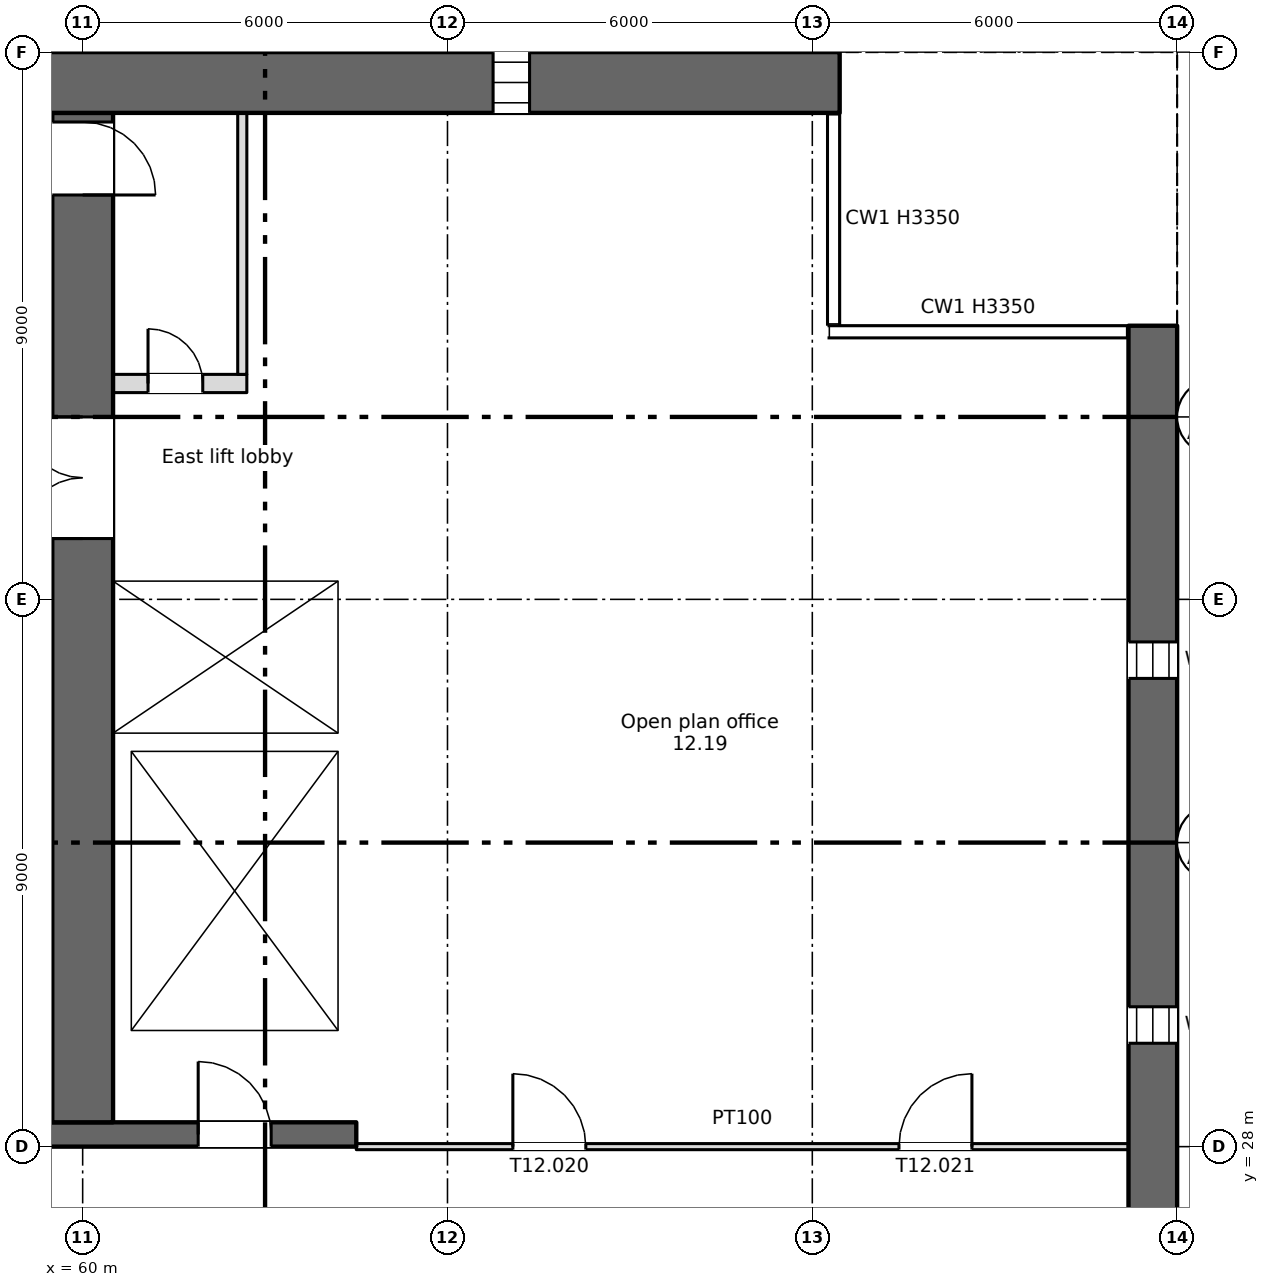
"""IFC4 building model, lengths in metres.
Left out: names, types, materials, properties, quantities, classifications, styles, units other than length and angle.
Written with IfcOpenShell. Run it as: python <this file> out.ifc"""

import sys

from ifc_helpers import new_model, si_unit, direction, frame, frame_2d, origin, place, context, subcontext, project, spatial, rectangle, extrude, element, fill, save


model = new_model("IFC4")
c1 = context("Model", 3, precision=1e-05, world=origin(), true_north=direction((0.0, 1.0)))
c2 = subcontext(c1, "Body", "Model", "MODEL_VIEW")
j1 = project(units=[si_unit("LENGTHUNIT", "METRE"), si_unit("PLANEANGLEUNIT", "RADIAN")], contexts=[c1])
p1 = place(None, origin())
s1 = spatial("IfcSite", under=j1, at=p1, CompositionType="ELEMENT")
p2 = place(p1, origin())
s2 = spatial("IfcBuilding", under=s1, at=p2, CompositionType="ELEMENT")
p3 = place(p2, frame((0.0, 0.0, 60.0)))
s3 = spatial("IfcBuildingStorey", under=s2, at=p3, CompositionType="ELEMENT", Elevation=60.0)
p4 = place(p3, frame((77.6, 4.5, 0.0), z_axis=(0.0, 0.0, 1.0), x_axis=(0.0, 1.0, 0.0)))
e1 = element("IfcWall", 1, at=p4, inside=s3, PredefinedType="SHEAR", context=c2, shape_type="SweptSolid", body=[
    extrude(rectangle(XDim=37.0, YDim=0.8, at=frame_2d((18.5, 0.0))), origin(), (0.0, 0.0, 1.0), 3.35),
])
p5 = place(p4, frame((1.2, 0.0, 0.6)))
e2 = element("IfcOpeningElement", 2, at=p5, cuts=e1, PredefinedType="OPENING", context=c2, shape_type="SweptSolid", body=[
    extrude(rectangle(XDim=0.6, YDim=2.4, at=frame_2d((0.3, 1.2))), frame((0.0, 0.41, 0.0), z_axis=(0.0, -1.0, 0.0), x_axis=(1.0, 0.0, 0.0)), (0.0, 0.0, 1.0), 0.82),
])
p6 = place(p4, frame((7.2, 0.0, 0.6)))
e3 = element("IfcOpeningElement", 3, at=p6, cuts=e1, PredefinedType="OPENING", context=c2, shape_type="SweptSolid", body=[
    extrude(rectangle(XDim=0.6, YDim=2.4, at=frame_2d((0.3, 1.2))), frame((0.0, 0.41, 0.0), z_axis=(0.0, -1.0, 0.0), x_axis=(1.0, 0.0, 0.0)), (0.0, 0.0, 1.0), 0.82),
])
p7 = place(p4, frame((13.2, 0.0, 0.6)))
e4 = element("IfcOpeningElement", 4, at=p7, cuts=e1, PredefinedType="OPENING", context=c2, shape_type="SweptSolid", body=[
    extrude(rectangle(XDim=0.6, YDim=2.4, at=frame_2d((0.3, 1.2))), frame((0.0, 0.41, 0.0), z_axis=(0.0, -1.0, 0.0), x_axis=(1.0, 0.0, 0.0)), (0.0, 0.0, 1.0), 0.82),
])
p8 = place(p4, frame((19.2, 0.0, 0.6)))
e5 = element("IfcOpeningElement", 5, at=p8, cuts=e1, PredefinedType="OPENING", context=c2, shape_type="SweptSolid", body=[
    extrude(rectangle(XDim=0.6, YDim=2.4, at=frame_2d((0.3, 1.2))), frame((0.0, 0.41, 0.0), z_axis=(0.0, -1.0, 0.0), x_axis=(1.0, 0.0, 0.0)), (0.0, 0.0, 1.0), 0.82),
])
p9 = place(p4, frame((25.2, 0.0, 0.6)))
e6 = element("IfcOpeningElement", 6, at=p9, cuts=e1, PredefinedType="OPENING", context=c2, shape_type="SweptSolid", body=[
    extrude(rectangle(XDim=0.6, YDim=2.4, at=frame_2d((0.3, 1.2))), frame((0.0, 0.41, 0.0), z_axis=(0.0, -1.0, 0.0), x_axis=(1.0, 0.0, 0.0)), (0.0, 0.0, 1.0), 0.82),
])
p10 = place(p4, frame((31.2, 0.0, 0.6)))
e7 = element("IfcOpeningElement", 7, at=p10, cuts=e1, PredefinedType="OPENING", context=c2, shape_type="SweptSolid", body=[
    extrude(rectangle(XDim=0.6, YDim=2.4, at=frame_2d((0.3, 1.2))), frame((0.0, 0.41, 0.0), z_axis=(0.0, -1.0, 0.0), x_axis=(1.0, 0.0, 0.0)), (0.0, 0.0, 1.0), 0.82),
])
p11 = place(p3, frame((5.55, 45.5, 0.0), z_axis=(0.0, 0.0, 1.0), x_axis=(1.0, 0.0, 0.0)))
e8 = element("IfcWall", 8, at=p11, inside=s3, PredefinedType="SHEAR", context=c2, shape_type="SweptSolid", body=[
    extrude(rectangle(XDim=66.9, YDim=1.0, at=frame_2d((33.45, 0.0))), origin(), (0.0, 0.0, 1.0), 3.35),
])
p12 = place(p11, frame((1.2, 0.0, 0.6)))
e9 = element("IfcOpeningElement", 9, at=p12, cuts=e8, PredefinedType="OPENING", context=c2, shape_type="SweptSolid", body=[
    extrude(rectangle(XDim=0.6, YDim=2.4, at=frame_2d((0.3, 1.2))), frame((0.0, 0.51, 0.0), z_axis=(0.0, -1.0, 0.0), x_axis=(1.0, 0.0, 0.0)), (0.0, 0.0, 1.0), 1.02),
])
p13 = place(p11, frame((7.2, 0.0, 0.6)))
e10 = element("IfcOpeningElement", 10, at=p13, cuts=e8, PredefinedType="OPENING", context=c2, shape_type="SweptSolid", body=[
    extrude(rectangle(XDim=0.6, YDim=2.4, at=frame_2d((0.3, 1.2))), frame((0.0, 0.51, 0.0), z_axis=(0.0, -1.0, 0.0), x_axis=(1.0, 0.0, 0.0)), (0.0, 0.0, 1.0), 1.02),
])
p14 = place(p11, frame((61.2, 0.0, 0.6)))
e11 = element("IfcOpeningElement", 11, at=p14, cuts=e8, PredefinedType="OPENING", context=c2, shape_type="SweptSolid", body=[
    extrude(rectangle(XDim=0.6, YDim=2.4, at=frame_2d((0.3, 1.2))), frame((0.0, 0.51, 0.0), z_axis=(0.0, -1.0, 0.0), x_axis=(1.0, 0.0, 0.0)), (0.0, 0.0, 1.0), 1.02),
])
p15 = place(p3, frame((6.7, 28.2, 0.0), z_axis=(0.0, 0.0, 1.0), x_axis=(1.0, 0.0, 0.0)))
e12 = element("IfcWall", 12, at=p15, inside=s3, PredefinedType="SHEAR", context=c2, shape_type="SweptSolid", body=[
    extrude(rectangle(XDim=57.8, YDim=0.4, at=frame_2d((28.9, 0.0))), origin(), (0.0, 0.0, 1.0), 3.35),
])
p16 = place(p15, frame((13.85, 0.0, 0.0)))
e13 = element("IfcOpeningElement", 13, at=p16, cuts=e12, PredefinedType="OPENING", context=c2, shape_type="SweptSolid", body=[
    extrude(rectangle(XDim=0.9, YDim=2.1, at=frame_2d((0.45, 1.05))), frame((0.0, 0.21, 0.0), z_axis=(0.0, -1.0, 0.0), x_axis=(1.0, 0.0, 0.0)), (0.0, 0.0, 1.0), 0.42),
])
p17 = place(p15, frame((48.562, 0.0, 0.0)))
e14 = element("IfcOpeningElement", 14, at=p17, cuts=e12, PredefinedType="OPENING", context=c2, shape_type="SweptSolid", body=[
    extrude(rectangle(XDim=0.9, YDim=2.1, at=frame_2d((0.45, 1.05))), frame((0.0, 0.21, 0.0), z_axis=(0.0, -1.0, 0.0), x_axis=(1.0, 0.0, 0.0)), (0.0, 0.0, 1.0), 0.42),
])
p18 = place(p15, frame((51.137, 0.0, 0.0)))
e15 = element("IfcOpeningElement", 15, at=p18, cuts=e12, PredefinedType="OPENING", context=c2, shape_type="SweptSolid", body=[
    extrude(rectangle(XDim=0.9, YDim=2.1, at=frame_2d((0.45, 1.05))), frame((0.0, 0.21, 0.0), z_axis=(0.0, -1.0, 0.0), x_axis=(1.0, 0.0, 0.0)), (0.0, 0.0, 1.0), 0.42),
])
p19 = place(p15, frame((1.35, 0.0, 0.0)))
e16 = element("IfcOpeningElement", 16, at=p19, cuts=e12, PredefinedType="OPENING", context=c2, shape_type="SweptSolid", body=[
    extrude(rectangle(XDim=0.9, YDim=2.1, at=frame_2d((0.45, 1.05))), frame((0.0, 0.21, 0.0), z_axis=(0.0, -1.0, 0.0), x_axis=(1.0, 0.0, 0.0)), (0.0, 0.0, 1.0), 0.42),
])
p20 = place(p15, frame((4.7, 0.0, 0.0)))
e17 = element("IfcOpeningElement", 17, at=p20, cuts=e12, PredefinedType="OPENING", context=c2, shape_type="SweptSolid", body=[
    extrude(rectangle(XDim=1.2, YDim=2.1, at=frame_2d((0.6, 1.05))), frame((0.0, 0.21, 0.0), z_axis=(0.0, -1.0, 0.0), x_axis=(1.0, 0.0, 0.0)), (0.0, 0.0, 1.0), 0.42),
])
p21 = place(p15, frame((31.7, 0.0, 0.0)))
e18 = element("IfcOpeningElement", 18, at=p21, cuts=e12, PredefinedType="OPENING", context=c2, shape_type="SweptSolid", body=[
    extrude(rectangle(XDim=1.2, YDim=2.1, at=frame_2d((0.6, 1.05))), frame((0.0, 0.21, 0.0), z_axis=(0.0, -1.0, 0.0), x_axis=(1.0, 0.0, 0.0)), (0.0, 0.0, 1.0), 0.42),
])
p22 = place(p15, frame((55.2, 0.0, 0.0)))
e19 = element("IfcOpeningElement", 19, at=p22, cuts=e12, PredefinedType="OPENING", context=c2, shape_type="SweptSolid", body=[
    extrude(rectangle(XDim=1.2, YDim=2.1, at=frame_2d((0.6, 1.05))), frame((0.0, 0.21, 0.0), z_axis=(0.0, -1.0, 0.0), x_axis=(1.0, 0.0, 0.0)), (0.0, 0.0, 1.0), 0.42),
])
p23 = place(p15, frame((21.7, 0.0, 0.0)))
e20 = element("IfcOpeningElement", 20, at=p23, cuts=e12, PredefinedType="OPENING", context=c2, shape_type="SweptSolid", body=[
    extrude(rectangle(XDim=1.2, YDim=2.1, at=frame_2d((0.6, 1.05))), frame((0.0, 0.21, 0.0), z_axis=(0.0, -1.0, 0.0), x_axis=(1.0, 0.0, 0.0)), (0.0, 0.0, 1.0), 0.42),
])
p24 = place(p15, frame((41.7, 0.0, 0.0)))
e21 = element("IfcOpeningElement", 21, at=p24, cuts=e12, PredefinedType="OPENING", context=c2, shape_type="SweptSolid", body=[
    extrude(rectangle(XDim=1.2, YDim=2.1, at=frame_2d((0.6, 1.05))), frame((0.0, 0.21, 0.0), z_axis=(0.0, -1.0, 0.0), x_axis=(1.0, 0.0, 0.0)), (0.0, 0.0, 1.0), 0.42),
])
p25 = place(p15, frame((24.85, 0.0, 0.0)))
e22 = element("IfcOpeningElement", 22, at=p25, cuts=e12, PredefinedType="OPENING", context=c2, shape_type="SweptSolid", body=[
    extrude(rectangle(XDim=2.4, YDim=2.1, at=frame_2d((1.2, 1.05))), frame((0.0, 0.21, 0.0), z_axis=(0.0, -1.0, 0.0), x_axis=(1.0, 0.0, 0.0)), (0.0, 0.0, 1.0), 0.42),
])
p26 = place(p15, frame((37.35, 0.0, 0.0)))
e23 = element("IfcOpeningElement", 23, at=p26, cuts=e12, PredefinedType="OPENING", context=c2, shape_type="SweptSolid", body=[
    extrude(rectangle(XDim=2.4, YDim=2.1, at=frame_2d((1.2, 1.05))), frame((0.0, 0.21, 0.0), z_axis=(0.0, -1.0, 0.0), x_axis=(1.0, 0.0, 0.0)), (0.0, 0.0, 1.0), 0.42),
])
p27 = place(p15, frame((7.85, 0.0, 0.0)))
e24 = element("IfcOpeningElement", 24, at=p27, cuts=e12, PredefinedType="OPENING", context=c2, shape_type="SweptSolid", body=[
    extrude(rectangle(XDim=2.4, YDim=2.1, at=frame_2d((1.2, 1.05))), frame((0.0, 0.21, 0.0), z_axis=(0.0, -1.0, 0.0), x_axis=(1.0, 0.0, 0.0)), (0.0, 0.0, 1.0), 0.42),
])
p28 = place(p15, frame((28.85, 0.0, 0.0)))
e25 = element("IfcOpeningElement", 25, at=p28, cuts=e12, PredefinedType="OPENING", context=c2, shape_type="SweptSolid", body=[
    extrude(rectangle(XDim=0.9, YDim=2.1, at=frame_2d((0.45, 1.05))), frame((0.0, 0.21, 0.0), z_axis=(0.0, -1.0, 0.0), x_axis=(1.0, 0.0, 0.0)), (0.0, 0.0, 1.0), 0.42),
])
p29 = place(p15, frame((34.85, 0.0, 0.0)))
e26 = element("IfcOpeningElement", 26, at=p29, cuts=e12, PredefinedType="OPENING", context=c2, shape_type="SweptSolid", body=[
    extrude(rectangle(XDim=0.9, YDim=2.1, at=frame_2d((0.45, 1.05))), frame((0.0, 0.21, 0.0), z_axis=(0.0, -1.0, 0.0), x_axis=(1.0, 0.0, 0.0)), (0.0, 0.0, 1.0), 0.42),
])
p30 = place(p3, frame((64.35, 34.8, 0.0), z_axis=(0.0, 0.0, 1.0), x_axis=(0.0, 1.0, 0.0)))
e27 = element("IfcWall", 27, at=p30, inside=s3, PredefinedType="SHEAR", context=c2, shape_type="SweptSolid", body=[
    extrude(rectangle(XDim=10.2, YDim=0.3, at=frame_2d((5.1, 0.0))), origin(), (0.0, 0.0, 1.0), 3.35),
])
p31 = place(p3, frame((60.0, 28.4, 0.0), z_axis=(0.0, 0.0, 1.0), x_axis=(0.0, 1.0, 0.0)))
e28 = element("IfcWall", 28, at=p31, inside=s3, PredefinedType="SHEAR", context=c2, shape_type="SweptSolid", body=[
    extrude(rectangle(XDim=16.6, YDim=1.0, at=frame_2d((8.3, 0.0))), origin(), (0.0, 0.0, 1.0), 3.35),
])
p32 = place(p31, frame((9.6, 0.0, 0.0)))
e29 = element("IfcOpeningElement", 29, at=p32, cuts=e28, PredefinedType="OPENING", context=c2, shape_type="SweptSolid", body=[
    extrude(rectangle(XDim=2.0, YDim=2.1, at=frame_2d((1.0, 1.05))), frame((0.0, 0.51, 0.0), z_axis=(0.0, -1.0, 0.0), x_axis=(1.0, 0.0, 0.0)), (0.0, 0.0, 1.0), 1.02),
])
p33 = place(p31, frame((15.25, 0.0, 0.0)))
e30 = element("IfcOpeningElement", 30, at=p33, cuts=e28, PredefinedType="OPENING", context=c2, shape_type="SweptSolid", body=[
    extrude(rectangle(XDim=1.2, YDim=2.1, at=frame_2d((0.6, 1.05))), frame((0.0, 0.51, 0.0), z_axis=(0.0, -1.0, 0.0), x_axis=(1.0, 0.0, 0.0)), (0.0, 0.0, 1.0), 1.02),
])
for number, where, z_axis, x_axis in (
    (31, (60.65, 28.4, 0.0), (0.0, 0.0, 1.0), (0.0, 1.0, 0.0)),
    (32, (64.35, 28.4, 0.0), (0.0, 0.0, 1.0), (0.0, 1.0, 0.0)),
):
    element("IfcWall", number, at=place(p3, frame(where, z_axis=z_axis, x_axis=x_axis)), inside=s3, PredefinedType="SHEAR", context=c2, shape_type="SweptSolid", body=[
        extrude(rectangle(XDim=6.1, YDim=0.3, at=frame_2d((3.05, 0.0))), origin(), (0.0, 0.0, 1.0), 3.35),
    ])
p34 = place(p3, frame((47.3, 34.65, 0.0), z_axis=(0.0, 0.0, 1.0), x_axis=(1.0, 0.0, 0.0)))
e33 = element("IfcWall", 33, at=p34, inside=s3, PredefinedType="SHEAR", context=c2, shape_type="SweptSolid", body=[
    extrude(rectangle(XDim=12.2, YDim=0.3, at=frame_2d((6.1, 0.0))), origin(), (0.0, 0.0, 1.0), 3.35),
])
p35 = place(p34, frame((1.3, 0.0, 0.0)))
e34 = element("IfcOpeningElement", 34, at=p35, cuts=e33, PredefinedType="OPENING", context=c2, shape_type="SweptSolid", body=[
    extrude(rectangle(XDim=1.1, YDim=2.1, at=frame_2d((0.55, 1.05))), frame((0.0, 0.16, 0.0), z_axis=(0.0, -1.0, 0.0), x_axis=(1.0, 0.0, 0.0)), (0.0, 0.0, 1.0), 0.32),
])
p36 = place(p3, frame((60.5, 34.65, 0.0), z_axis=(0.0, 0.0, 1.0), x_axis=(1.0, 0.0, 0.0)))
e35 = element("IfcWall", 35, at=p36, inside=s3, PredefinedType="SHEAR", context=c2, shape_type="SweptSolid", body=[
    extrude(rectangle(XDim=4.0, YDim=0.3, at=frame_2d((2.0, 0.0))), origin(), (0.0, 0.0, 1.0), 3.35),
])
p37 = place(p3, frame((60.5, 37.45, 0.0), z_axis=(0.0, 0.0, 1.0), x_axis=(1.0, 0.0, 0.0)))
e36 = element("IfcWall", 36, at=p37, inside=s3, PredefinedType="SHEAR", context=c2, shape_type="SweptSolid", body=[
    extrude(rectangle(XDim=3.7, YDim=0.3, at=frame_2d((1.85, 0.0))), origin(), (0.0, 0.0, 1.0), 3.35),
])
p38 = place(p37, frame((1.3, 0.0, 0.0)))
e37 = element("IfcOpeningElement", 37, at=p38, cuts=e36, PredefinedType="OPENING", context=c2, shape_type="SweptSolid", body=[
    extrude(rectangle(XDim=1.1, YDim=2.1, at=frame_2d((0.55, 1.05))), frame((0.0, 0.16, 0.0), z_axis=(0.0, -1.0, 0.0), x_axis=(1.0, 0.0, 0.0)), (0.0, 0.0, 1.0), 0.32),
])
p39 = place(p3, frame((60.5, 40.55, 0.0), z_axis=(0.0, 0.0, 1.0), x_axis=(1.0, 0.0, 0.0)))
e38 = element("IfcWall", 38, at=p39, inside=s3, PredefinedType="PARTITIONING", context=c2, shape_type="SweptSolid", body=[
    extrude(rectangle(XDim=2.2, YDim=0.3, at=frame_2d((1.1, 0.0))), origin(), (0.0, 0.0, 1.0), 3.35),
])
p40 = place(p39, frame((0.575, 0.0, 0.0)))
e39 = element("IfcOpeningElement", 39, at=p40, cuts=e38, PredefinedType="OPENING", context=c2, shape_type="SweptSolid", body=[
    extrude(rectangle(XDim=0.9, YDim=2.1, at=frame_2d((0.45, 1.05))), frame((0.0, 0.16, 0.0), z_axis=(0.0, -1.0, 0.0), x_axis=(1.0, 0.0, 0.0)), (0.0, 0.0, 1.0), 0.32),
])
p41 = place(p3, frame((62.625, 40.7, 0.0), z_axis=(0.0, 0.0, 1.0), x_axis=(0.0, 1.0, 0.0)))
e40 = element("IfcWall", 40, at=p41, inside=s3, PredefinedType="PARTITIONING", context=c2, shape_type="SweptSolid", body=[
    extrude(rectangle(XDim=4.3, YDim=0.15, at=frame_2d((2.15, 0.0))), origin(), (0.0, 0.0, 1.0), 3.35),
])
p42 = place(p3, frame((64.5, 28.0, 0.0), z_axis=(0.0, 0.0, 1.0), x_axis=(1.0, 0.0, 0.0)))
e41 = element("IfcWall", 41, at=p42, inside=s3, PredefinedType="PARTITIONING", context=c2, shape_type="SweptSolid", body=[
    extrude(rectangle(XDim=12.7, YDim=0.1, at=frame_2d((6.35, 0.0))), origin(), (0.0, 0.0, 1.0), 3.35),
])
p43 = place(p42, frame((2.575, 0.0, 0.0)))
e42 = element("IfcOpeningElement", 42, at=p43, cuts=e41, PredefinedType="OPENING", context=c2, shape_type="SweptSolid", body=[
    extrude(rectangle(XDim=1.2, YDim=2.1, at=frame_2d((0.6, 1.05))), frame((0.0, 0.06, 0.0), z_axis=(0.0, -1.0, 0.0), x_axis=(1.0, 0.0, 0.0)), (0.0, 0.0, 1.0), 0.12),
])
p44 = place(p42, frame((8.925, 0.0, 0.0)))
e43 = element("IfcOpeningElement", 43, at=p44, cuts=e41, PredefinedType="OPENING", context=c2, shape_type="SweptSolid", body=[
    extrude(rectangle(XDim=1.2, YDim=2.1, at=frame_2d((0.6, 1.05))), frame((0.0, 0.06, 0.0), z_axis=(0.0, -1.0, 0.0), x_axis=(1.0, 0.0, 0.0)), (0.0, 0.0, 1.0), 0.12),
])
p45 = place(p14, origin())
e44 = element("IfcWindow", 44, at=p45, inside=s3, PartitioningType="SINGLE_PANEL", PredefinedType="WINDOW", context=c2, shape_type="SweptSolid", body=[
    extrude(rectangle(XDim=0.6, YDim=2.4, at=frame_2d((0.3, 1.2))), frame((0.0, 0.03, 0.0), z_axis=(0.0, -1.0, 0.0), x_axis=(1.0, 0.0, 0.0)), (0.0, 0.0, 1.0), 0.06),
])
fill(e11, e44)
p46 = place(p9, origin())
e45 = element("IfcWindow", 45, at=p46, inside=s3, PartitioningType="SINGLE_PANEL", PredefinedType="WINDOW", context=c2, shape_type="SweptSolid", body=[
    extrude(rectangle(XDim=0.6, YDim=2.4, at=frame_2d((0.3, 1.2))), frame((0.0, 0.03, 0.0), z_axis=(0.0, -1.0, 0.0), x_axis=(1.0, 0.0, 0.0)), (0.0, 0.0, 1.0), 0.06),
])
fill(e6, e45)
p47 = place(p10, origin())
e46 = element("IfcWindow", 46, at=p47, inside=s3, PartitioningType="SINGLE_PANEL", PredefinedType="WINDOW", context=c2, shape_type="SweptSolid", body=[
    extrude(rectangle(XDim=0.6, YDim=2.4, at=frame_2d((0.3, 1.2))), frame((0.0, 0.03, 0.0), z_axis=(0.0, -1.0, 0.0), x_axis=(1.0, 0.0, 0.0)), (0.0, 0.0, 1.0), 0.06),
])
fill(e7, e46)
p48 = place(p40, origin())
e47 = element("IfcDoor", 47, at=p48, inside=s3, OperationType="SINGLE_SWING_LEFT", PredefinedType="DOOR", context=c2, shape_type="SweptSolid", body=[
    extrude(rectangle(XDim=0.9, YDim=2.1, at=frame_2d((0.45, 1.05))), frame((0.0, 0.025, 0.0), z_axis=(0.0, -1.0, 0.0), x_axis=(1.0, 0.0, 0.0)), (0.0, 0.0, 1.0), 0.05),
])
fill(e39, e47)
p49 = place(p38, origin())
e48 = element("IfcDoor", 48, at=p49, inside=s3, OperationType="SLIDING_TO_LEFT", PredefinedType="DOOR", context=c2, shape_type="SweptSolid", body=[
    extrude(rectangle(XDim=1.1, YDim=2.1, at=frame_2d((0.55, 1.05))), frame((0.0, 0.025, 0.0), z_axis=(0.0, -1.0, 0.0), x_axis=(1.0, 0.0, 0.0)), (0.0, 0.0, 1.0), 0.05),
])
fill(e37, e48)
p50 = place(p22, origin())
e49 = element("IfcDoor", 49, at=p50, inside=s3, OperationType="SINGLE_SWING_LEFT", PredefinedType="DOOR", context=c2, shape_type="SweptSolid", body=[
    extrude(rectangle(XDim=1.2, YDim=2.1, at=frame_2d((0.6, 1.05))), frame((0.0, 0.025, 0.0), z_axis=(0.0, -1.0, 0.0), x_axis=(1.0, 0.0, 0.0)), (0.0, 0.0, 1.0), 0.05),
])
fill(e19, e49)
p51 = place(p32, origin())
e50 = element("IfcDoor", 50, at=p51, inside=s3, OperationType="DOUBLE_DOOR_SINGLE_SWING", PredefinedType="DOOR", context=c2, shape_type="SweptSolid", body=[
    extrude(rectangle(XDim=2.0, YDim=2.1, at=frame_2d((1.0, 1.05))), frame((0.0, 0.025, 0.0), z_axis=(0.0, -1.0, 0.0), x_axis=(1.0, 0.0, 0.0)), (0.0, 0.0, 1.0), 0.05),
])
fill(e29, e50)
p52 = place(p33, origin())
e51 = element("IfcDoor", 51, at=p52, inside=s3, OperationType="SINGLE_SWING_LEFT", PredefinedType="DOOR", context=c2, shape_type="SweptSolid", body=[
    extrude(rectangle(XDim=1.2, YDim=2.1, at=frame_2d((0.6, 1.05))), frame((0.0, 0.025, 0.0), z_axis=(0.0, -1.0, 0.0), x_axis=(1.0, 0.0, 0.0)), (0.0, 0.0, 1.0), 0.05),
])
fill(e30, e51)
p53 = place(p43, origin())
e52 = element("IfcDoor", 52, at=p53, inside=s3, OperationType="SINGLE_SWING_LEFT", PredefinedType="DOOR", context=c2, shape_type="SweptSolid", body=[
    extrude(rectangle(XDim=1.2, YDim=2.1, at=frame_2d((0.6, 1.05))), frame((0.0, 0.025, 0.0), z_axis=(0.0, -1.0, 0.0), x_axis=(1.0, 0.0, 0.0)), (0.0, 0.0, 1.0), 0.05),
])
fill(e42, e52)
p54 = place(p44, origin())
e53 = element("IfcDoor", 53, at=p54, inside=s3, OperationType="SINGLE_SWING_RIGHT", PredefinedType="DOOR", context=c2, shape_type="SweptSolid", body=[
    extrude(rectangle(XDim=1.2, YDim=2.1, at=frame_2d((0.6, 1.05))), frame((0.0, 0.025, 0.0), z_axis=(0.0, -1.0, 0.0), x_axis=(1.0, 0.0, 0.0)), (0.0, 0.0, 1.0), 0.05),
])
fill(e43, e53)
save(model, sys.argv[1])
